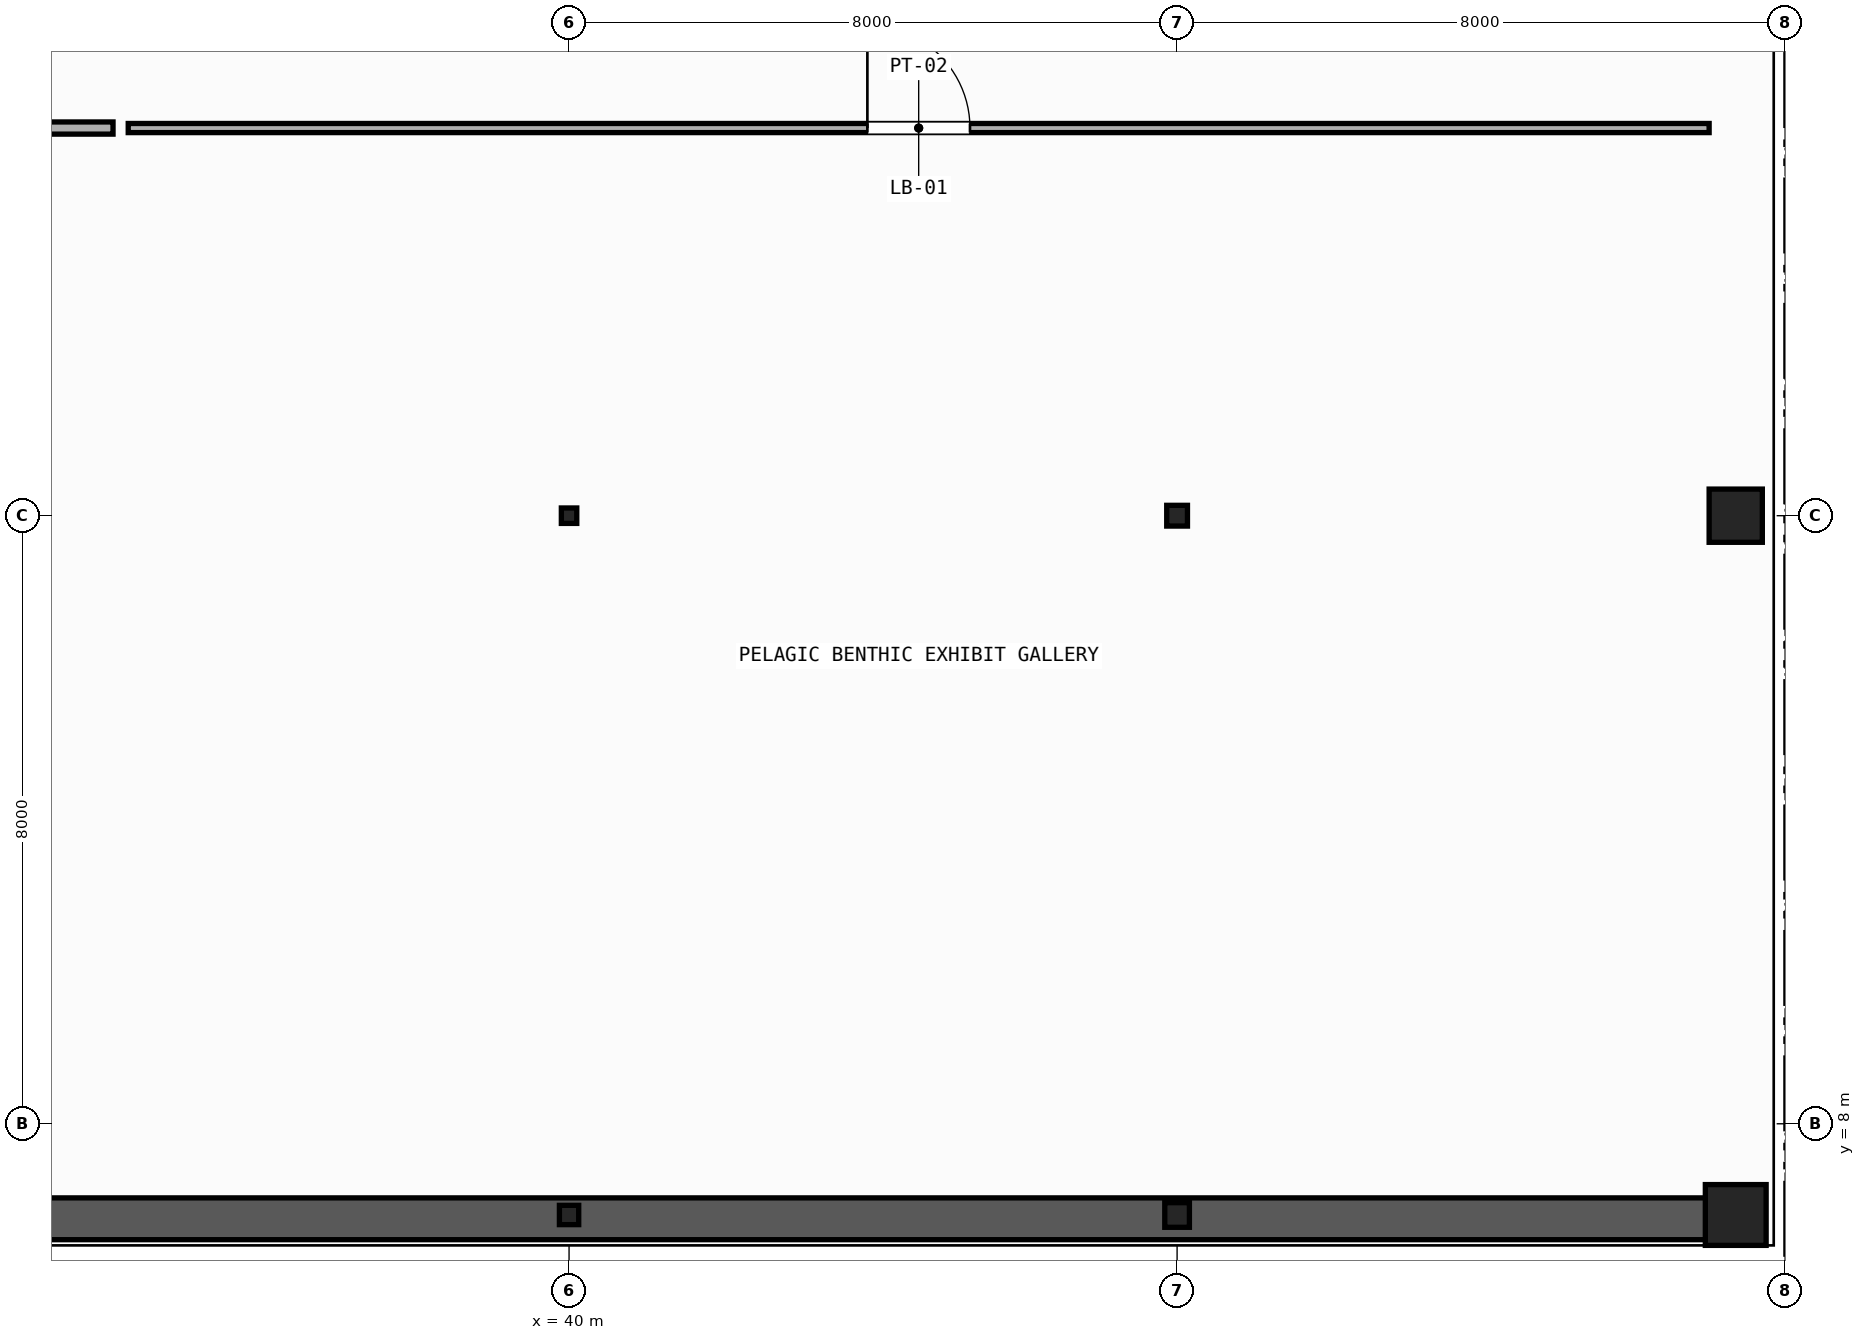
"""IFC4 building model, lengths in metres.
Left out: names, types, materials, properties, quantities, classifications, styles, units other than length and angle.
Written with IfcOpenShell. Run it as: python <this file> out.ifc"""

import sys

from ifc_helpers import new_model, si_unit, direction, frame, frame_2d, origin, origin_2d, place, context, subcontext, project, spatial, rectangle, hollow_rectangle, hollow_circle, extrude, element, fill, save


model = new_model("IFC4")
c1 = context("Model", 3, precision=1e-05, world=origin(), true_north=direction((0.0, 1.0)))
c2 = subcontext(c1, "Body", "Model", "MODEL_VIEW")
j1 = project(units=[si_unit("LENGTHUNIT", "METRE"), si_unit("PLANEANGLEUNIT", "RADIAN")], contexts=[c1])
p1 = place(None, origin())
s1 = spatial("IfcSite", under=j1, at=p1, CompositionType="ELEMENT")
p2 = place(p1, origin())
s2 = spatial("IfcBuilding", under=s1, at=p2, CompositionType="ELEMENT")
p3 = place(p2, frame((0.0, 0.0, -5.4)))
s3 = spatial("IfcBuildingStorey", under=s2, at=p3, CompositionType="ELEMENT", Elevation=-5.4)
p4 = place(p3, frame((40.0, 6.8, 0.0), z_axis=(0.0, 0.0, 1.0), x_axis=(1.0, 0.0, 0.0)))
e1 = element("IfcColumn", 1, at=p4, inside=s3, PredefinedType="COLUMN", context=c2, shape_type="SweptSolid", body=[
    extrude(hollow_rectangle(XDim=0.254, YDim=0.254, WallThickness=0.012, InnerFilletRadius=0.012, OuterFilletRadius=0.024, at=origin_2d()), origin(), (0.0, 0.0, 1.0), 5.08),
])
p5 = place(p3, frame((40.0, 16.0, 0.0), z_axis=(0.0, 0.0, 1.0), x_axis=(0.0, 1.0, 0.0)))
e2 = element("IfcColumn", 2, at=p5, inside=s3, PredefinedType="COLUMN", context=c2, shape_type="SweptSolid", body=[
    extrude(hollow_rectangle(XDim=0.203, YDim=0.203, WallThickness=0.009, InnerFilletRadius=0.009, OuterFilletRadius=0.018, at=origin_2d()), origin(), (0.0, 0.0, 1.0), 5.08),
])
p6 = place(p3, frame((48.0, 6.8, 0.0), z_axis=(0.0, 0.0, 1.0), x_axis=(0.0, 1.0, 0.0)))
e3 = element("IfcColumn", 3, at=p6, inside=s3, PredefinedType="COLUMN", context=c2, shape_type="SweptSolid", body=[
    extrude(hollow_circle(Radius=0.162, WallThickness=0.012, at=origin_2d()), origin(), (0.0, 0.0, 1.0), 5.08),
])
p7 = place(p3, frame((48.0, 16.0, 0.0), z_axis=(0.0, 0.0, 1.0), x_axis=(1.0, 0.0, 0.0)))
e4 = element("IfcColumn", 4, at=p7, inside=s3, PredefinedType="COLUMN", context=c2, shape_type="SweptSolid", body=[
    extrude(hollow_circle(Radius=0.136, WallThickness=0.012, at=origin_2d()), origin(), (0.0, 0.0, 1.0), 5.08),
])
p8 = place(p3, frame((55.35, 6.8, 0.0), z_axis=(0.0, 0.0, 1.0), x_axis=(1.0, 0.0, 0.0)))
e5 = element("IfcColumn", 5, at=p8, inside=s3, PredefinedType="COLUMN", context=c2, shape_type="SweptSolid", body=[
    extrude(rectangle(XDim=0.8, YDim=0.8, at=origin_2d()), origin(), (0.0, 0.0, 1.0), 5.08),
])
p9 = place(p3, frame((55.35, 16.0, 0.0), z_axis=(0.0, 0.0, 1.0), x_axis=(0.0, 1.0, 0.0)))
e6 = element("IfcColumn", 6, at=p9, inside=s3, PredefinedType="COLUMN", context=c2, shape_type="SweptSolid", body=[
    extrude(rectangle(XDim=0.7, YDim=0.7, at=origin_2d()), origin(), (0.0, 0.0, 1.0), 5.08),
])
p10 = place(p3, frame((10.0, 6.75, 0.0), z_axis=(0.0, 0.0, 1.0), x_axis=(1.0, 0.0, 0.0)))
e7 = element("IfcWall", 7, at=p10, inside=s3, PredefinedType="USERDEFINED", context=c2, shape_type="SweptSolid", body=[
    extrude(rectangle(XDim=45.4, YDim=0.55, at=frame_2d((22.7, 0.0))), origin(), (0.0, 0.0, 1.0), 5.06),
])
p11 = place(p3, frame((10.0, 21.1, 0.0), z_axis=(0.0, 0.0, 1.0), x_axis=(1.0, 0.0, 0.0)))
e8 = element("IfcWall", 8, at=p11, inside=s3, PredefinedType="PARTITIONING", context=c2, shape_type="SweptSolid", body=[
    extrude(rectangle(XDim=24.0, YDim=0.16, at=frame_2d((12.0, 0.0))), origin(), (0.0, 0.0, 1.0), 4.29),
])
p12 = place(p11, frame((11.275, 0.0, 0.0)))
e9 = element("IfcOpeningElement", 9, at=p12, cuts=e8, PredefinedType="OPENING", context=c2, shape_type="SweptSolid", body=[
    extrude(rectangle(XDim=1.45, YDim=2.25, at=frame_2d((0.725, 1.125))), frame((0.0, 0.09, 0.0), z_axis=(0.0, -1.0, 0.0), x_axis=(1.0, 0.0, 0.0)), (0.0, 0.0, 1.0), 0.18),
])
p13 = place(p3, frame((34.2, 21.1, 0.0), z_axis=(0.0, 0.0, 1.0), x_axis=(1.0, 0.0, 0.0)))
e10 = element("IfcWall", 10, at=p13, inside=s3, PredefinedType="PARTITIONING", context=c2, shape_type="SweptSolid", body=[
    extrude(rectangle(XDim=20.8, YDim=0.12, at=frame_2d((10.4, 0.0))), origin(), (0.0, 0.0, 1.0), 4.278),
])
p14 = place(p13, frame((9.725, 0.0, 0.0)))
e11 = element("IfcOpeningElement", 11, at=p14, cuts=e10, PredefinedType="OPENING", context=c2, shape_type="SweptSolid", body=[
    extrude(rectangle(XDim=1.35, YDim=2.25, at=frame_2d((0.675, 1.125))), frame((0.0, 0.07, 0.0), z_axis=(0.0, -1.0, 0.0), x_axis=(1.0, 0.0, 0.0)), (0.0, 0.0, 1.0), 0.14),
])
p15 = place(p14, origin())
e12 = element("IfcDoor", 12, at=p15, inside=s3, OperationType="SINGLE_SWING_LEFT", PredefinedType="DOOR", context=c2, shape_type="SweptSolid", body=[
    extrude(rectangle(XDim=1.35, YDim=2.25, at=frame_2d((0.675, 1.125))), frame((0.0, 0.025, 0.0), z_axis=(0.0, -1.0, 0.0), x_axis=(1.0, 0.0, 0.0)), (0.0, 0.0, 1.0), 0.05),
])
fill(e11, e12)
save(model, sys.argv[1])
